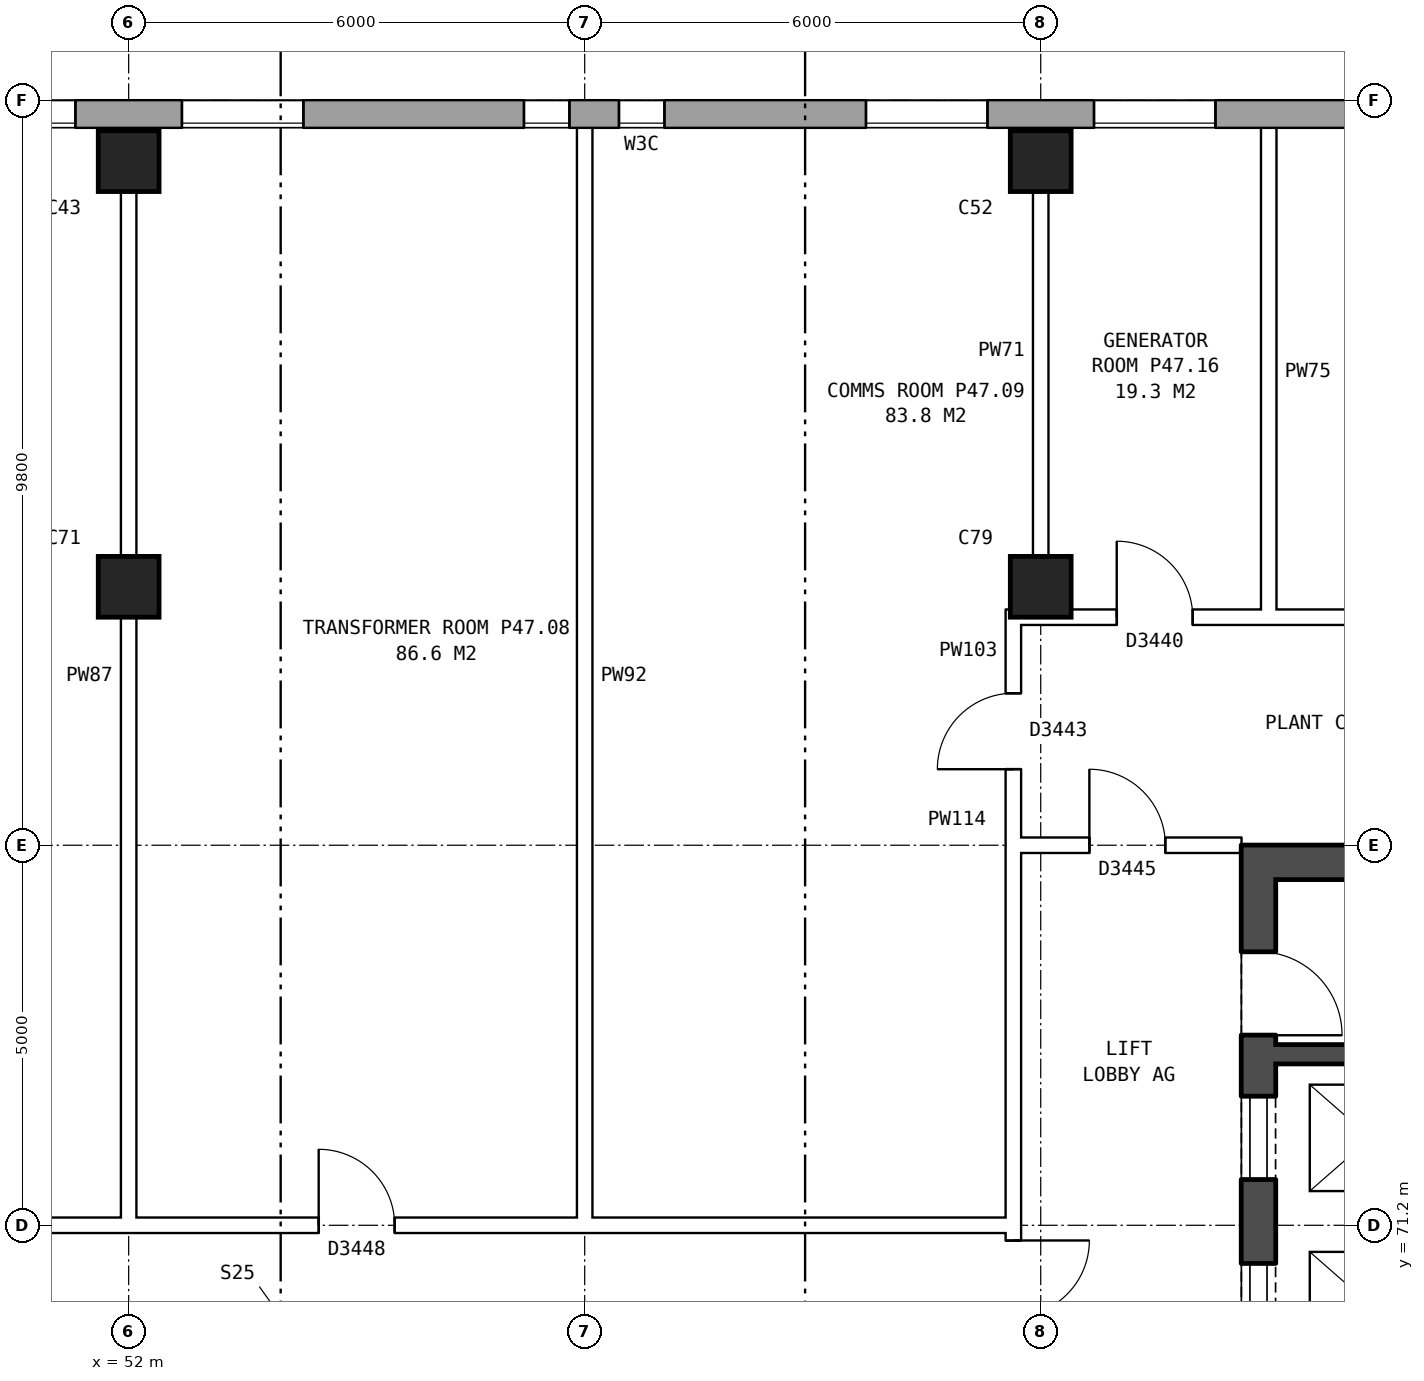
"""IFC4 building model, lengths in metres.
Left out: names, types, materials, properties, quantities, classifications, styles, units other than length and angle.
Written with IfcOpenShell. Run it as: python <this file> out.ifc"""

import sys

from ifc_helpers import new_model, si_unit, direction, frame, frame_2d, origin, origin_2d, place, context, subcontext, project, spatial, rectangle, extrude, element, fill, save


model = new_model("IFC4")
c1 = context("Model", 3, precision=1e-05, world=origin(), true_north=direction((0.0, 1.0)))
c2 = subcontext(c1, "Body", "Model", "MODEL_VIEW")
j1 = project(units=[si_unit("LENGTHUNIT", "METRE"), si_unit("PLANEANGLEUNIT", "RADIAN")], contexts=[c1])
p1 = place(None, origin())
s1 = spatial("IfcSite", under=j1, at=p1, CompositionType="ELEMENT")
p2 = place(p1, origin())
s2 = spatial("IfcBuilding", under=s1, at=p2, CompositionType="ELEMENT")
p3 = place(p2, frame((0.0, 0.0, 167.1)))
s3 = spatial("IfcBuildingStorey", under=s2, at=p3, CompositionType="ELEMENT", Elevation=167.1)
for number, where, z_axis, x_axis in (
    (1, (52.0, 79.6, 0.0), (0.0, 0.0, 1.0), (1.0, 0.0, 0.0)),
    (2, (52.0, 85.2, 0.0), (0.0, 0.0, 1.0), (1.0, 0.0, 0.0)),
    (3, (64.0, 79.6, 0.0), (0.0, 0.0, 1.0), (1.0, 0.0, 0.0)),
    (4, (64.0, 85.2, 0.0), (0.0, 0.0, 1.0), (1.0, 0.0, 0.0)),
):
    element("IfcColumn", number, at=place(p3, frame(where, z_axis=z_axis, x_axis=x_axis)), inside=s3, PredefinedType="COLUMN", context=c2, shape_type="SweptSolid", body=[
        extrude(rectangle(XDim=0.8, YDim=0.8, at=origin_2d()), origin(), (0.0, 0.0, 1.0), 4.2),
    ])
p4 = place(p3, frame((72.925, 85.82, 0.0), z_axis=(0.0, 0.0, 1.0), x_axis=(-1.0, 0.0, 0.0)))
e5 = element("IfcWall", 5, at=p4, inside=s3, PredefinedType="STANDARD", context=c2, shape_type="SweptSolid", body=[
    extrude(rectangle(XDim=39.601, YDim=0.36, at=frame_2d((19.8, 0.0))), origin(), (0.0, 0.0, 1.0), 4.2),
])
p5 = place(p4, frame((2.25, 0.0, 1.5)))
e6 = element("IfcOpeningElement", 6, at=p5, cuts=e5, PredefinedType="OPENING", context=c2, shape_type="SweptSolid", body=[
    extrude(rectangle(XDim=1.6, YDim=1.2, at=frame_2d((0.8, 0.6))), frame((0.0, 0.19, 0.0), z_axis=(0.0, -1.0, 0.0), x_axis=(1.0, 0.0, 0.0)), (0.0, 0.0, 1.0), 0.38),
])
p6 = place(p4, frame((6.625, 0.0, 1.5)))
e7 = element("IfcOpeningElement", 7, at=p6, cuts=e5, PredefinedType="OPENING", context=c2, shape_type="SweptSolid", body=[
    extrude(rectangle(XDim=1.6, YDim=1.2, at=frame_2d((0.8, 0.6))), frame((0.0, 0.19, 0.0), z_axis=(0.0, -1.0, 0.0), x_axis=(1.0, 0.0, 0.0)), (0.0, 0.0, 1.0), 0.38),
])
p7 = place(p4, frame((9.625, 0.0, 1.5)))
e8 = element("IfcOpeningElement", 8, at=p7, cuts=e5, PredefinedType="OPENING", context=c2, shape_type="SweptSolid", body=[
    extrude(rectangle(XDim=1.6, YDim=1.2, at=frame_2d((0.8, 0.6))), frame((0.0, 0.19, 0.0), z_axis=(0.0, -1.0, 0.0), x_axis=(1.0, 0.0, 0.0)), (0.0, 0.0, 1.0), 0.38),
])
p8 = place(p4, frame((13.875, 0.0, 1.5)))
e9 = element("IfcOpeningElement", 9, at=p8, cuts=e5, PredefinedType="OPENING", context=c2, shape_type="SweptSolid", body=[
    extrude(rectangle(XDim=0.6, YDim=1.2, at=frame_2d((0.3, 0.6))), frame((0.0, 0.19, 0.0), z_axis=(0.0, -1.0, 0.0), x_axis=(1.0, 0.0, 0.0)), (0.0, 0.0, 1.0), 0.38),
])
p9 = place(p4, frame((15.125, 0.0, 1.5)))
e10 = element("IfcOpeningElement", 10, at=p9, cuts=e5, PredefinedType="OPENING", context=c2, shape_type="SweptSolid", body=[
    extrude(rectangle(XDim=0.6, YDim=1.2, at=frame_2d((0.3, 0.6))), frame((0.0, 0.19, 0.0), z_axis=(0.0, -1.0, 0.0), x_axis=(1.0, 0.0, 0.0)), (0.0, 0.0, 1.0), 0.38),
])
p10 = place(p4, frame((18.625, 0.0, 1.5)))
e11 = element("IfcOpeningElement", 11, at=p10, cuts=e5, PredefinedType="OPENING", context=c2, shape_type="SweptSolid", body=[
    extrude(rectangle(XDim=1.6, YDim=1.2, at=frame_2d((0.8, 0.6))), frame((0.0, 0.19, 0.0), z_axis=(0.0, -1.0, 0.0), x_axis=(1.0, 0.0, 0.0)), (0.0, 0.0, 1.0), 0.38),
])
p11 = place(p4, frame((21.625, 0.0, 1.5)))
e12 = element("IfcOpeningElement", 12, at=p11, cuts=e5, PredefinedType="OPENING", context=c2, shape_type="SweptSolid", body=[
    extrude(rectangle(XDim=1.6, YDim=1.2, at=frame_2d((0.8, 0.6))), frame((0.0, 0.19, 0.0), z_axis=(0.0, -1.0, 0.0), x_axis=(1.0, 0.0, 0.0)), (0.0, 0.0, 1.0), 0.38),
])
p12 = place(p4, frame((25.475, 0.0, 1.5)))
e13 = element("IfcOpeningElement", 13, at=p12, cuts=e5, PredefinedType="OPENING", context=c2, shape_type="SweptSolid", body=[
    extrude(rectangle(XDim=1.6, YDim=1.2, at=frame_2d((0.8, 0.6))), frame((0.0, 0.19, 0.0), z_axis=(0.0, -1.0, 0.0), x_axis=(1.0, 0.0, 0.0)), (0.0, 0.0, 1.0), 0.38),
])
p13 = place(p4, frame((30.625, 0.0, 1.5)))
e14 = element("IfcOpeningElement", 14, at=p13, cuts=e5, PredefinedType="OPENING", context=c2, shape_type="SweptSolid", body=[
    extrude(rectangle(XDim=1.6, YDim=1.2, at=frame_2d((0.8, 0.6))), frame((0.0, 0.19, 0.0), z_axis=(0.0, -1.0, 0.0), x_axis=(1.0, 0.0, 0.0)), (0.0, 0.0, 1.0), 0.38),
])
p14 = place(p4, frame((32.525, 0.0, 1.5)))
e15 = element("IfcOpeningElement", 15, at=p14, cuts=e5, PredefinedType="OPENING", context=c2, shape_type="SweptSolid", body=[
    extrude(rectangle(XDim=1.6, YDim=1.2, at=frame_2d((0.8, 0.6))), frame((0.0, 0.19, 0.0), z_axis=(0.0, -1.0, 0.0), x_axis=(1.0, 0.0, 0.0)), (0.0, 0.0, 1.0), 0.38),
])
p15 = place(p4, frame((37.075, 0.0, 1.5)))
e16 = element("IfcOpeningElement", 16, at=p15, cuts=e5, PredefinedType="OPENING", context=c2, shape_type="SweptSolid", body=[
    extrude(rectangle(XDim=1.6, YDim=1.2, at=frame_2d((0.8, 0.6))), frame((0.0, 0.19, 0.0), z_axis=(0.0, -1.0, 0.0), x_axis=(1.0, 0.0, 0.0)), (0.0, 0.0, 1.0), 0.38),
])
p16 = place(p3, frame((66.865, 63.8, 0.0), z_axis=(0.0, 0.0, 1.0), x_axis=(0.0, 1.0, 0.0)))
e17 = element("IfcWall", 17, at=p16, inside=s3, PredefinedType="SHEAR", context=c2, shape_type="SweptSolid", body=[
    extrude(rectangle(XDim=12.4, YDim=0.45, at=frame_2d((6.2, 0.0))), origin(), (0.0, 0.0, 1.0), 4.2),
])
p17 = place(p16, frame((1.325, 0.0, 0.0)))
e18 = element("IfcOpeningElement", 18, at=p17, cuts=e17, PredefinedType="OPENING", context=c2, shape_type="SweptSolid", body=[
    extrude(rectangle(XDim=1.1, YDim=2.1, at=frame_2d((0.55, 1.05))), frame((0.0, 0.235, 0.0), z_axis=(0.0, -1.0, 0.0), x_axis=(1.0, 0.0, 0.0)), (0.0, 0.0, 1.0), 0.47),
])
p18 = place(p16, frame((3.6, 0.0, 0.0)))
e19 = element("IfcOpeningElement", 19, at=p18, cuts=e17, PredefinedType="OPENING", context=c2, shape_type="SweptSolid", body=[
    extrude(rectangle(XDim=1.1, YDim=2.1, at=frame_2d((0.55, 1.05))), frame((0.0, 0.235, 0.0), z_axis=(0.0, -1.0, 0.0), x_axis=(1.0, 0.0, 0.0)), (0.0, 0.0, 1.0), 0.47),
])
p19 = place(p16, frame((5.8, 0.0, 0.0)))
e20 = element("IfcOpeningElement", 20, at=p19, cuts=e17, PredefinedType="OPENING", context=c2, shape_type="SweptSolid", body=[
    extrude(rectangle(XDim=1.1, YDim=2.1, at=frame_2d((0.55, 1.05))), frame((0.0, 0.235, 0.0), z_axis=(0.0, -1.0, 0.0), x_axis=(1.0, 0.0, 0.0)), (0.0, 0.0, 1.0), 0.47),
])
p20 = place(p16, frame((8.0, 0.0, 0.0)))
e21 = element("IfcOpeningElement", 21, at=p20, cuts=e17, PredefinedType="OPENING", context=c2, shape_type="SweptSolid", body=[
    extrude(rectangle(XDim=1.1, YDim=2.1, at=frame_2d((0.55, 1.05))), frame((0.0, 0.235, 0.0), z_axis=(0.0, -1.0, 0.0), x_axis=(1.0, 0.0, 0.0)), (0.0, 0.0, 1.0), 0.47),
])
p21 = place(p16, frame((9.9, 0.0, 0.0)))
e22 = element("IfcOpeningElement", 22, at=p21, cuts=e17, PredefinedType="OPENING", context=c2, shape_type="SweptSolid", body=[
    extrude(rectangle(XDim=1.1, YDim=2.1, at=frame_2d((0.55, 1.05))), frame((0.0, 0.235, 0.0), z_axis=(0.0, -1.0, 0.0), x_axis=(1.0, 0.0, 0.0)), (0.0, 0.0, 1.0), 0.47),
])
p22 = place(p3, frame((67.09, 75.975, 0.0), z_axis=(0.0, 0.0, 1.0), x_axis=(1.0, 0.0, 0.0)))
e23 = element("IfcWall", 23, at=p22, inside=s3, PredefinedType="SHEAR", context=c2, shape_type="SweptSolid", body=[
    extrude(rectangle(XDim=8.1, YDim=0.45, at=frame_2d((4.05, 0.0))), origin(), (0.0, 0.0, 1.0), 4.2),
])
p23 = place(p3, frame((67.09, 73.45, 0.0), z_axis=(0.0, 0.0, 1.0), x_axis=(1.0, 0.0, 0.0)))
e24 = element("IfcWall", 24, at=p23, inside=s3, PredefinedType="SHEAR", context=c2, shape_type="SweptSolid", body=[
    extrude(rectangle(XDim=2.475, YDim=0.25, at=frame_2d((1.237, 0.0))), origin(), (0.0, 0.0, 1.0), 4.2),
])
p24 = place(p3, frame((63.64, 63.9, 0.0), z_axis=(0.0, 0.0, 1.0), x_axis=(0.0, 1.0, 0.0)))
e25 = element("IfcWall", 25, at=p24, inside=s3, PredefinedType="PARTITIONING", context=c2, shape_type="SweptSolid", body=[
    extrude(rectangle(XDim=12.2, YDim=0.2, at=frame_2d((6.1, 0.0))), origin(), (0.0, 0.0, 1.0), 4.2),
])
p25 = place(p24, frame((5.1, 0.0, 0.0)))
e26 = element("IfcOpeningElement", 26, at=p25, cuts=e25, PredefinedType="OPENING", context=c2, shape_type="SweptSolid", body=[
    extrude(rectangle(XDim=2.0, YDim=2.1, at=frame_2d((1.0, 1.05))), frame((0.0, 0.11, 0.0), z_axis=(0.0, -1.0, 0.0), x_axis=(1.0, 0.0, 0.0)), (0.0, 0.0, 1.0), 0.22),
])
p26 = place(p3, frame((44.36, 71.2, 0.0), z_axis=(0.0, 0.0, 1.0), x_axis=(1.0, 0.0, 0.0)))
e27 = element("IfcWall", 27, at=p26, inside=s3, PredefinedType="PARTITIONING", context=c2, shape_type="SweptSolid", body=[
    extrude(rectangle(XDim=19.28, YDim=0.2, at=frame_2d((9.64, 0.0))), origin(), (0.0, 0.0, 1.0), 4.2),
])
p27 = place(p26, frame((10.14, 0.0, 0.0)))
e28 = element("IfcOpeningElement", 28, at=p27, cuts=e27, PredefinedType="OPENING", context=c2, shape_type="SweptSolid", body=[
    extrude(rectangle(XDim=1.0, YDim=2.1, at=frame_2d((0.5, 1.05))), frame((0.0, 0.11, 0.0), z_axis=(0.0, -1.0, 0.0), x_axis=(1.0, 0.0, 0.0)), (0.0, 0.0, 1.0), 0.22),
])
p28 = place(p3, frame((63.54, 76.2, 0.0), z_axis=(0.0, 0.0, 1.0), x_axis=(1.0, 0.0, 0.0)))
e29 = element("IfcWall", 29, at=p28, inside=s3, PredefinedType="PARTITIONING", context=c2, shape_type="SweptSolid", body=[
    extrude(rectangle(XDim=3.1, YDim=0.2, at=frame_2d((1.55, 0.0))), origin(), (0.0, 0.0, 1.0), 4.2),
])
p29 = place(p28, frame((1.1, 0.0, 0.0)))
e30 = element("IfcOpeningElement", 30, at=p29, cuts=e29, PredefinedType="OPENING", context=c2, shape_type="SweptSolid", body=[
    extrude(rectangle(XDim=1.0, YDim=2.1, at=frame_2d((0.5, 1.05))), frame((0.0, 0.11, 0.0), z_axis=(0.0, -1.0, 0.0), x_axis=(1.0, 0.0, 0.0)), (0.0, 0.0, 1.0), 0.22),
])
p30 = place(p3, frame((63.54, 79.2, 0.0), z_axis=(0.0, 0.0, 1.0), x_axis=(1.0, 0.0, 0.0)))
e31 = element("IfcWall", 31, at=p30, inside=s3, PredefinedType="PARTITIONING", context=c2, shape_type="SweptSolid", body=[
    extrude(rectangle(XDim=12.22, YDim=0.2, at=frame_2d((6.11, 0.0))), origin(), (0.0, 0.0, 1.0), 4.2),
])
p31 = place(p30, frame((1.46, 0.0, 0.0)))
e32 = element("IfcOpeningElement", 32, at=p31, cuts=e31, PredefinedType="OPENING", context=c2, shape_type="SweptSolid", body=[
    extrude(rectangle(XDim=1.0, YDim=2.1, at=frame_2d((0.5, 1.05))), frame((0.0, 0.11, 0.0), z_axis=(0.0, -1.0, 0.0), x_axis=(1.0, 0.0, 0.0)), (0.0, 0.0, 1.0), 0.22),
])
p32 = place(p30, frame((7.28, 0.0, 0.0)))
e33 = element("IfcOpeningElement", 33, at=p32, cuts=e31, PredefinedType="OPENING", context=c2, shape_type="SweptSolid", body=[
    extrude(rectangle(XDim=1.0, YDim=2.1, at=frame_2d((0.5, 1.05))), frame((0.0, 0.11, 0.0), z_axis=(0.0, -1.0, 0.0), x_axis=(1.0, 0.0, 0.0)), (0.0, 0.0, 1.0), 0.22),
])
for number, where, z_axis, x_axis in (
    (34, (52.0, 71.1, 0.0), (0.0, 0.0, 1.0), (0.0, 1.0, 0.0)),
    (35, (58.0, 71.1, 0.0), (0.0, 0.0, 1.0), (0.0, 1.0, 0.0)),
):
    element("IfcWall", number, at=place(p3, frame(where, z_axis=z_axis, x_axis=x_axis)), inside=s3, PredefinedType="PARTITIONING", context=c2, shape_type="SweptSolid", body=[
        extrude(rectangle(XDim=14.66, YDim=0.2, at=frame_2d((7.33, 0.0))), origin(), (0.0, 0.0, 1.0), 4.2),
    ])
p33 = place(p3, frame((63.64, 76.1, 0.0), z_axis=(0.0, 0.0, 1.0), x_axis=(0.0, 1.0, 0.0)))
e36 = element("IfcWall", 36, at=p33, inside=s3, PredefinedType="PARTITIONING", context=c2, shape_type="SweptSolid", body=[
    extrude(rectangle(XDim=3.2, YDim=0.2, at=frame_2d((1.6, 0.0))), origin(), (0.0, 0.0, 1.0), 4.2),
])
p34 = place(p33, frame((1.1, 0.0, 0.0)))
e37 = element("IfcOpeningElement", 37, at=p34, cuts=e36, PredefinedType="OPENING", context=c2, shape_type="SweptSolid", body=[
    extrude(rectangle(XDim=1.0, YDim=2.1, at=frame_2d((0.5, 1.05))), frame((0.0, 0.11, 0.0), z_axis=(0.0, -1.0, 0.0), x_axis=(1.0, 0.0, 0.0)), (0.0, 0.0, 1.0), 0.22),
])
for number, where, z_axis, x_axis in (
    (38, (64.0, 79.1, 0.0), (0.0, 0.0, 1.0), (0.0, 1.0, 0.0)),
    (39, (67.0, 79.1, 0.0), (0.0, 0.0, 1.0), (0.0, 1.0, 0.0)),
):
    element("IfcWall", number, at=place(p3, frame(where, z_axis=z_axis, x_axis=x_axis)), inside=s3, PredefinedType="PARTITIONING", context=c2, shape_type="SweptSolid", body=[
        extrude(rectangle(XDim=6.66, YDim=0.2, at=frame_2d((3.33, 0.0))), origin(), (0.0, 0.0, 1.0), 4.2),
    ])
p35 = place(p6, origin())
e40 = element("IfcWindow", 40, at=p35, inside=s3, PartitioningType="DOUBLE_PANEL_HORIZONTAL", PredefinedType="WINDOW", context=c2, shape_type="SweptSolid", body=[
    extrude(rectangle(XDim=1.6, YDim=1.2, at=frame_2d((0.8, 0.6))), frame((0.0, 0.15, 0.0), z_axis=(0.0, -1.0, 0.0), x_axis=(1.0, 0.0, 0.0)), (0.0, 0.0, 1.0), 0.06),
])
fill(e7, e40)
p36 = place(p7, origin())
e41 = element("IfcWindow", 41, at=p36, inside=s3, PartitioningType="DOUBLE_PANEL_HORIZONTAL", PredefinedType="WINDOW", context=c2, shape_type="SweptSolid", body=[
    extrude(rectangle(XDim=1.6, YDim=1.2, at=frame_2d((0.8, 0.6))), frame((0.0, 0.15, 0.0), z_axis=(0.0, -1.0, 0.0), x_axis=(1.0, 0.0, 0.0)), (0.0, 0.0, 1.0), 0.06),
])
fill(e8, e41)
p37 = place(p8, origin())
e42 = element("IfcWindow", 42, at=p37, inside=s3, PartitioningType="DOUBLE_PANEL_HORIZONTAL", PredefinedType="WINDOW", context=c2, shape_type="SweptSolid", body=[
    extrude(rectangle(XDim=0.6, YDim=1.2, at=frame_2d((0.3, 0.6))), frame((0.0, 0.15, 0.0), z_axis=(0.0, -1.0, 0.0), x_axis=(1.0, 0.0, 0.0)), (0.0, 0.0, 1.0), 0.06),
])
fill(e9, e42)
p38 = place(p9, origin())
e43 = element("IfcWindow", 43, at=p38, inside=s3, PartitioningType="DOUBLE_PANEL_HORIZONTAL", PredefinedType="WINDOW", context=c2, shape_type="SweptSolid", body=[
    extrude(rectangle(XDim=0.6, YDim=1.2, at=frame_2d((0.3, 0.6))), frame((0.0, 0.15, 0.0), z_axis=(0.0, -1.0, 0.0), x_axis=(1.0, 0.0, 0.0)), (0.0, 0.0, 1.0), 0.06),
])
fill(e10, e43)
p39 = place(p10, origin())
e44 = element("IfcWindow", 44, at=p39, inside=s3, PartitioningType="DOUBLE_PANEL_HORIZONTAL", PredefinedType="WINDOW", context=c2, shape_type="SweptSolid", body=[
    extrude(rectangle(XDim=1.6, YDim=1.2, at=frame_2d((0.8, 0.6))), frame((0.0, 0.15, 0.0), z_axis=(0.0, -1.0, 0.0), x_axis=(1.0, 0.0, 0.0)), (0.0, 0.0, 1.0), 0.06),
])
fill(e11, e44)
p40 = place(p11, origin())
e45 = element("IfcWindow", 45, at=p40, inside=s3, PartitioningType="DOUBLE_PANEL_HORIZONTAL", PredefinedType="WINDOW", context=c2, shape_type="SweptSolid", body=[
    extrude(rectangle(XDim=1.6, YDim=1.2, at=frame_2d((0.8, 0.6))), frame((0.0, 0.15, 0.0), z_axis=(0.0, -1.0, 0.0), x_axis=(1.0, 0.0, 0.0)), (0.0, 0.0, 1.0), 0.06),
])
fill(e12, e45)
p41 = place(p19, origin())
e46 = element("IfcDoor", 46, at=p41, inside=s3, OperationType="DOUBLE_DOOR_SLIDING", PredefinedType="DOOR", context=c2, shape_type="SweptSolid", body=[
    extrude(rectangle(XDim=1.1, YDim=2.1, at=frame_2d((0.55, 1.05))), frame((0.0, -0.16, 0.0), z_axis=(0.0, -1.0, 0.0), x_axis=(1.0, 0.0, 0.0)), (0.0, 0.0, 1.0), 0.05),
])
fill(e20, e46)
p42 = place(p20, origin())
e47 = element("IfcDoor", 47, at=p42, inside=s3, OperationType="DOUBLE_DOOR_SLIDING", PredefinedType="DOOR", context=c2, shape_type="SweptSolid", body=[
    extrude(rectangle(XDim=1.1, YDim=2.1, at=frame_2d((0.55, 1.05))), frame((0.0, -0.16, 0.0), z_axis=(0.0, -1.0, 0.0), x_axis=(1.0, 0.0, 0.0)), (0.0, 0.0, 1.0), 0.05),
])
fill(e21, e47)
p43 = place(p21, frame((1.1, 0.0, 0.0), z_axis=(0.0, 0.0, 1.0), x_axis=(-1.0, 0.0, 0.0)))
e48 = element("IfcDoor", 48, at=p43, inside=s3, OperationType="SINGLE_SWING_RIGHT", PredefinedType="DOOR", context=c2, shape_type="SweptSolid", body=[
    extrude(rectangle(XDim=1.1, YDim=2.1, at=frame_2d((0.55, 1.05))), frame((0.0, 0.21, 0.0), z_axis=(0.0, -1.0, 0.0), x_axis=(1.0, 0.0, 0.0)), (0.0, 0.0, 1.0), 0.05),
])
fill(e22, e48)
p44 = place(p25, frame((2.0, 0.0, 0.0), z_axis=(0.0, 0.0, 1.0), x_axis=(-1.0, 0.0, 0.0)))
e49 = element("IfcDoor", 49, at=p44, inside=s3, OperationType="DOUBLE_DOOR_SINGLE_SWING", PredefinedType="DOOR", context=c2, shape_type="SweptSolid", body=[
    extrude(rectangle(XDim=2.0, YDim=2.1, at=frame_2d((1.0, 1.05))), frame((0.0, 0.025, 0.0), z_axis=(0.0, -1.0, 0.0), x_axis=(1.0, 0.0, 0.0)), (0.0, 0.0, 1.0), 0.05),
])
fill(e26, e49)
p45 = place(p27, origin())
e50 = element("IfcDoor", 50, at=p45, inside=s3, OperationType="SINGLE_SWING_LEFT", PredefinedType="DOOR", context=c2, shape_type="SweptSolid", body=[
    extrude(rectangle(XDim=1.0, YDim=2.1, at=frame_2d((0.5, 1.05))), frame((0.0, 0.025, 0.0), z_axis=(0.0, -1.0, 0.0), x_axis=(1.0, 0.0, 0.0)), (0.0, 0.0, 1.0), 0.05),
])
fill(e28, e50)
p46 = place(p29, origin())
e51 = element("IfcDoor", 51, at=p46, inside=s3, OperationType="SINGLE_SWING_LEFT", PredefinedType="DOOR", context=c2, shape_type="SweptSolid", body=[
    extrude(rectangle(XDim=1.0, YDim=2.1, at=frame_2d((0.5, 1.05))), frame((0.0, 0.025, 0.0), z_axis=(0.0, -1.0, 0.0), x_axis=(1.0, 0.0, 0.0)), (0.0, 0.0, 1.0), 0.05),
])
fill(e30, e51)
p47 = place(p31, origin())
e52 = element("IfcDoor", 52, at=p47, inside=s3, OperationType="SINGLE_SWING_LEFT", PredefinedType="DOOR", context=c2, shape_type="SweptSolid", body=[
    extrude(rectangle(XDim=1.0, YDim=2.1, at=frame_2d((0.5, 1.05))), frame((0.0, 0.025, 0.0), z_axis=(0.0, -1.0, 0.0), x_axis=(1.0, 0.0, 0.0)), (0.0, 0.0, 1.0), 0.05),
])
fill(e32, e52)
p48 = place(p34, origin())
e53 = element("IfcDoor", 53, at=p48, inside=s3, OperationType="SINGLE_SWING_LEFT", PredefinedType="DOOR", context=c2, shape_type="SweptSolid", body=[
    extrude(rectangle(XDim=1.0, YDim=2.1, at=frame_2d((0.5, 1.05))), frame((0.0, 0.025, 0.0), z_axis=(0.0, -1.0, 0.0), x_axis=(1.0, 0.0, 0.0)), (0.0, 0.0, 1.0), 0.05),
])
fill(e37, e53)
save(model, sys.argv[1])
